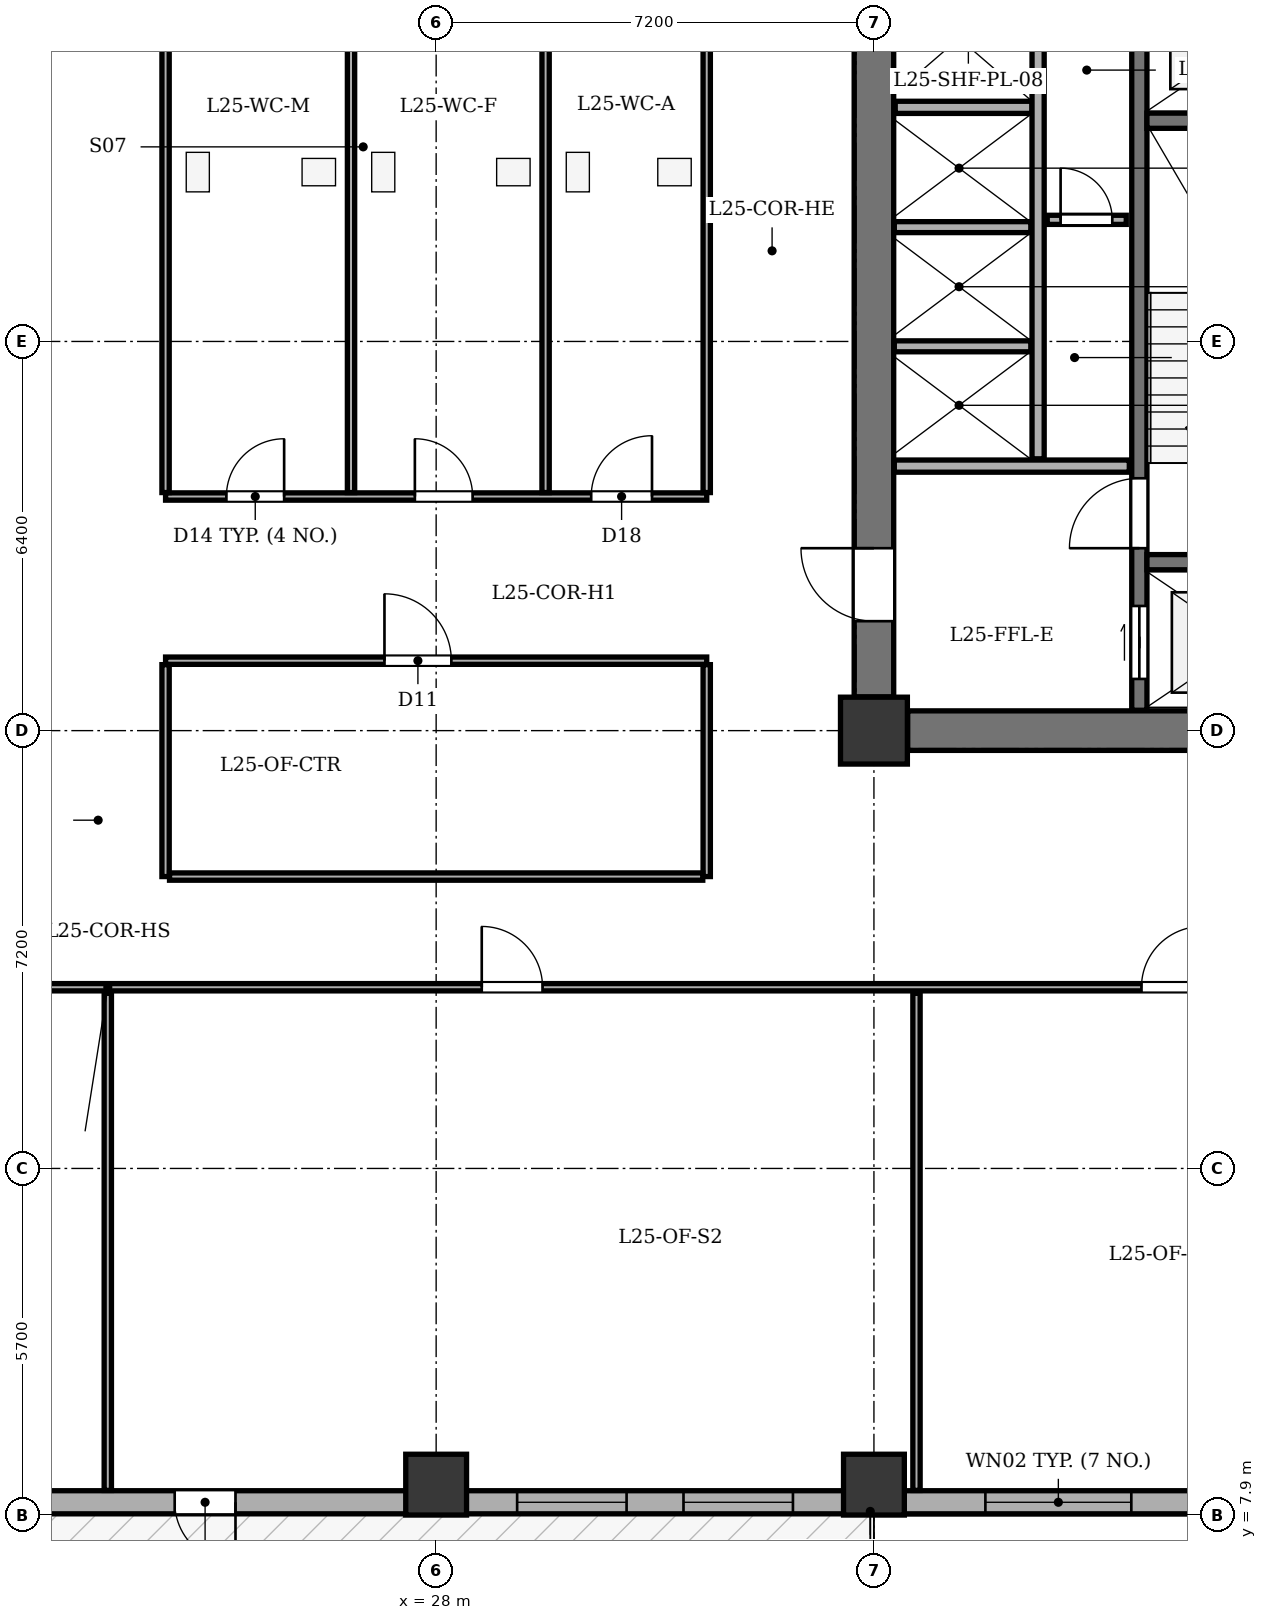
"""IFC4 building model, lengths in metres.
Left out: names, types, materials, properties, quantities, classifications, styles, units other than length and angle.
Written with IfcOpenShell. Run it as: python <this file> out.ifc"""

import sys

from ifc_helpers import new_model, si_unit, direction, frame, frame_2d, origin, origin_2d, place, context, subcontext, project, spatial, rectangle, extrude, element, fill, save


model = new_model("IFC4")
c1 = context("Model", 3, precision=1e-05, world=origin(), true_north=direction((0.0, 1.0)))
c2 = subcontext(c1, "Body", "Model", "MODEL_VIEW")
j1 = project(units=[si_unit("LENGTHUNIT", "METRE"), si_unit("PLANEANGLEUNIT", "RADIAN")], contexts=[c1])
p1 = place(None, origin())
s1 = spatial("IfcSite", under=j1, at=p1, CompositionType="ELEMENT")
p2 = place(p1, origin())
s2 = spatial("IfcBuilding", under=s1, at=p2, CompositionType="ELEMENT")
p3 = place(p2, frame((0.0, 0.0, 102.3)))
s3 = spatial("IfcBuildingStorey", under=s2, at=p3, CompositionType="ELEMENT", Elevation=102.3)
p4 = place(p3, frame((35.2, 20.8, 0.0), z_axis=(0.0, 0.0, 1.0), x_axis=(1.0, 0.0, 0.0)))
e1 = element("IfcColumn", 1, at=p4, inside=s3, PredefinedType="COLUMN", context=c2, shape_type="SweptSolid", body=[
    extrude(rectangle(XDim=1.1, YDim=1.1, at=origin_2d()), origin(), (0.0, 0.0, 1.0), 3.9),
])
for number, where, z_axis, x_axis in (
    (2, (28.0, 8.4, 0.0), (0.0, 0.0, 1.0), (1.0, 0.0, 0.0)),
    (3, (35.2, 8.4, 0.0), (0.0, 0.0, 1.0), (1.0, 0.0, 0.0)),
):
    element("IfcColumn", number, at=place(p3, frame(where, z_axis=z_axis, x_axis=x_axis)), inside=s3, PredefinedType="COLUMN", context=c2, shape_type="SweptSolid", body=[
        extrude(rectangle(XDim=1.0, YDim=1.0, at=origin_2d()), origin(), (0.0, 0.0, 1.0), 3.9),
    ])
p5 = place(p3, frame((44.3, 8.11, 0.0), z_axis=(0.0, 0.0, 1.0), x_axis=(-1.0, 0.0, 0.0)))
e4 = element("IfcWall", 4, at=p5, inside=s3, PredefinedType="STANDARD", context=c2, shape_type="SweptSolid", body=[
    extrude(rectangle(XDim=35.0, YDim=0.38, at=frame_2d((17.5, 0.0))), origin(), (0.0, 0.0, 1.0), 3.135),
])
p6 = place(p5, frame((19.6, 0.0, 0.0)))
e5 = element("IfcOpeningElement", 5, at=p6, cuts=e4, PredefinedType="OPENING", context=c2, shape_type="SweptSolid", body=[
    extrude(rectangle(XDim=1.0, YDim=2.02, at=frame_2d((0.5, 1.01))), frame((0.0, 0.2, 0.0), z_axis=(0.0, -1.0, 0.0), x_axis=(1.0, 0.0, 0.0)), (0.0, 0.0, 1.0), 0.4),
])
p7 = place(p5, frame((1.783, 0.0, 0.8)))
e6 = element("IfcOpeningElement", 6, at=p7, cuts=e4, PredefinedType="OPENING", context=c2, shape_type="SweptSolid", body=[
    extrude(rectangle(XDim=1.8, YDim=1.9, at=frame_2d((0.9, 0.95))), frame((0.0, 0.2, 0.0), z_axis=(0.0, -1.0, 0.0), x_axis=(1.0, 0.0, 0.0)), (0.0, 0.0, 1.0), 0.4),
])
p8 = place(p5, frame((4.867, 0.0, 0.8)))
e7 = element("IfcOpeningElement", 7, at=p8, cuts=e4, PredefinedType="OPENING", context=c2, shape_type="SweptSolid", body=[
    extrude(rectangle(XDim=2.4, YDim=1.9, at=frame_2d((1.2, 0.95))), frame((0.0, 0.2, 0.0), z_axis=(0.0, -1.0, 0.0), x_axis=(1.0, 0.0, 0.0)), (0.0, 0.0, 1.0), 0.4),
])
p9 = place(p5, frame((10.432, 0.0, 0.8)))
e8 = element("IfcOpeningElement", 8, at=p9, cuts=e4, PredefinedType="OPENING", context=c2, shape_type="SweptSolid", body=[
    extrude(rectangle(XDim=1.8, YDim=1.9, at=frame_2d((0.9, 0.95))), frame((0.0, 0.2, 0.0), z_axis=(0.0, -1.0, 0.0), x_axis=(1.0, 0.0, 0.0)), (0.0, 0.0, 1.0), 0.4),
])
p10 = place(p5, frame((13.168, 0.0, 0.8)))
e9 = element("IfcOpeningElement", 9, at=p10, cuts=e4, PredefinedType="OPENING", context=c2, shape_type="SweptSolid", body=[
    extrude(rectangle(XDim=1.8, YDim=1.9, at=frame_2d((0.9, 0.95))), frame((0.0, 0.2, 0.0), z_axis=(0.0, -1.0, 0.0), x_axis=(1.0, 0.0, 0.0)), (0.0, 0.0, 1.0), 0.4),
])
p11 = place(p5, frame((25.924, 0.0, 0.8)))
e10 = element("IfcOpeningElement", 10, at=p11, cuts=e4, PredefinedType="OPENING", context=c2, shape_type="SweptSolid", body=[
    extrude(rectangle(XDim=1.8, YDim=1.9, at=frame_2d((0.9, 0.95))), frame((0.0, 0.2, 0.0), z_axis=(0.0, -1.0, 0.0), x_axis=(1.0, 0.0, 0.0)), (0.0, 0.0, 1.0), 0.4),
])
p12 = place(p5, frame((30.376, 0.0, 0.8)))
e11 = element("IfcOpeningElement", 11, at=p12, cuts=e4, PredefinedType="OPENING", context=c2, shape_type="SweptSolid", body=[
    extrude(rectangle(XDim=2.4, YDim=1.9, at=frame_2d((1.2, 0.95))), frame((0.0, 0.2, 0.0), z_axis=(0.0, -1.0, 0.0), x_axis=(1.0, 0.0, 0.0)), (0.0, 0.0, 1.0), 0.4),
])
p13 = place(p3, frame((35.755, 20.8, 0.0), z_axis=(0.0, 0.0, 1.0), x_axis=(1.0, 0.0, 0.0)))
e12 = element("IfcWall", 12, at=p13, inside=s3, PredefinedType="SHEAR", context=c2, shape_type="SweptSolid", body=[
    extrude(rectangle(XDim=6.89, YDim=0.65, at=frame_2d((3.445, 0.0))), origin(), (0.0, 0.0, 1.0), 3.6),
])
p14 = place(p3, frame((35.2, 21.355, 0.0), z_axis=(0.0, 0.0, 1.0), x_axis=(0.0, 1.0, 0.0)))
e13 = element("IfcWall", 13, at=p14, inside=s3, PredefinedType="SHEAR", context=c2, shape_type="SweptSolid", body=[
    extrude(rectangle(XDim=11.69, YDim=0.65, at=frame_2d((5.845, 0.0))), origin(), (0.0, 0.0, 1.0), 3.6),
])
p15 = place(p14, frame((1.245, 0.0, 0.0)))
e14 = element("IfcOpeningElement", 14, at=p15, cuts=e13, PredefinedType="OPENING", context=c2, shape_type="SweptSolid", body=[
    extrude(rectangle(XDim=1.2, YDim=2.15, at=frame_2d((0.6, 1.075))), frame((0.0, 0.335, 0.0), z_axis=(0.0, -1.0, 0.0), x_axis=(1.0, 0.0, 0.0)), (0.0, 0.0, 1.0), 0.67),
])
p16 = place(p3, frame((39.565, 21.135, 0.0), z_axis=(0.0, 0.0, 1.0), x_axis=(0.0, 1.0, 0.0)))
e15 = element("IfcWall", 15, at=p16, inside=s3, PredefinedType="SHEAR", context=c2, shape_type="SweptSolid", body=[
    extrude(rectangle(XDim=12.13, YDim=0.25, at=frame_2d((6.065, 0.0))), origin(), (0.0, 0.0, 1.0), 3.6),
])
p17 = place(p16, frame((0.515, 0.0, 0.0)))
e16 = element("IfcOpeningElement", 16, at=p17, cuts=e15, PredefinedType="OPENING", context=c2, shape_type="SweptSolid", body=[
    extrude(rectangle(XDim=1.2, YDim=2.15, at=frame_2d((0.6, 1.075))), frame((0.0, 0.135, 0.0), z_axis=(0.0, -1.0, 0.0), x_axis=(1.0, 0.0, 0.0)), (0.0, 0.0, 1.0), 0.27),
])
p18 = place(p16, frame((2.665, 0.0, 0.0)))
e17 = element("IfcOpeningElement", 17, at=p18, cuts=e15, PredefinedType="OPENING", context=c2, shape_type="SweptSolid", body=[
    extrude(rectangle(XDim=1.15, YDim=2.15, at=frame_2d((0.575, 1.075))), frame((0.0, 0.135, 0.0), z_axis=(0.0, -1.0, 0.0), x_axis=(1.0, 0.0, 0.0)), (0.0, 0.0, 1.0), 0.27),
])
for number, where, z_axis, x_axis in (
    (18, (39.69, 23.57, 0.0), (0.0, 0.0, 1.0), (1.0, 0.0, 0.0)),
    (19, (39.69, 30.83, 0.0), (0.0, 0.0, 1.0), (1.0, 0.0, 0.0)),
):
    element("IfcWall", number, at=place(p3, frame(where, z_axis=z_axis, x_axis=x_axis)), inside=s3, PredefinedType="SHEAR", context=c2, shape_type="SweptSolid", body=[
        extrude(rectangle(XDim=3.175, YDim=0.25, at=frame_2d((1.587, 0.0))), origin(), (0.0, 0.0, 1.0), 3.6),
    ])
p19 = place(p3, frame((35.535, 25.15, 0.0), z_axis=(0.0, 0.0, 1.0), x_axis=(1.0, 0.0, 0.0)))
e20 = element("IfcWall", 20, at=p19, inside=s3, PredefinedType="SOLIDWALL", context=c2, shape_type="SweptSolid", body=[
    extrude(rectangle(XDim=3.865, YDim=0.2, at=frame_2d((1.933, 0.0))), origin(), (0.0, 0.0, 1.0), 3.6),
])
p20 = place(p3, frame((35.55, 31.05, 0.0), z_axis=(0.0, 0.0, 1.0), x_axis=(1.0, 0.0, 0.0)))
e21 = element("IfcWall", 21, at=p20, inside=s3, PredefinedType="SOLIDWALL", context=c2, shape_type="SweptSolid", body=[
    extrude(rectangle(XDim=2.25, YDim=0.2, at=frame_2d((1.125, 0.0))), origin(), (0.0, 0.0, 1.0), 3.6),
])
p21 = place(p3, frame((37.9, 25.27, 0.0), z_axis=(0.0, 0.0, 1.0), x_axis=(0.0, 1.0, 0.0)))
e22 = element("IfcWall", 22, at=p21, inside=s3, PredefinedType="SOLIDWALL", context=c2, shape_type="SweptSolid", body=[
    extrude(rectangle(XDim=7.995, YDim=0.2, at=frame_2d((3.998, 0.0))), origin(), (0.0, 0.0, 1.0), 3.6),
])
for number, where, z_axis, x_axis in (
    (23, (35.535, 27.12, 0.0), (0.0, 0.0, 1.0), (1.0, 0.0, 0.0)),
    (24, (35.535, 29.08, 0.0), (0.0, 0.0, 1.0), (1.0, 0.0, 0.0)),
):
    element("IfcWall", number, at=place(p3, frame(where, z_axis=z_axis, x_axis=x_axis)), inside=s3, PredefinedType="PARTITIONING", context=c2, shape_type="SweptSolid", body=[
        extrude(rectangle(XDim=2.245, YDim=0.18, at=frame_2d((1.123, 0.0))), origin(), (0.0, 0.0, 1.0), 3.6),
    ])
p22 = place(p3, frame((38.05, 29.2, 0.0), z_axis=(0.0, 0.0, 1.0), x_axis=(1.0, 0.0, 0.0)))
e25 = element("IfcWall", 25, at=p22, inside=s3, PredefinedType="PARTITIONING", context=c2, shape_type="SweptSolid", body=[
    extrude(rectangle(XDim=1.3, YDim=0.15, at=frame_2d((0.65, 0.0))), origin(), (0.0, 0.0, 1.0), 3.6),
])
p23 = place(p22, frame((0.22, 0.0, 0.0)))
e26 = element("IfcOpeningElement", 26, at=p23, cuts=e25, PredefinedType="OPENING", context=c2, shape_type="SweptSolid", body=[
    extrude(rectangle(XDim=0.85, YDim=2.02, at=frame_2d((0.425, 1.01))), frame((0.0, 0.085, 0.0), z_axis=(0.0, -1.0, 0.0), x_axis=(1.0, 0.0, 0.0)), (0.0, 0.0, 1.0), 0.17),
])
p24 = place(p3, frame((23.55, 24.65, 0.0), z_axis=(0.0, 0.0, 1.0), x_axis=(1.0, 0.0, 0.0)))
e27 = element("IfcWall", 27, at=p24, inside=s3, PredefinedType="PARTITIONING", context=c2, shape_type="SweptSolid", body=[
    extrude(rectangle(XDim=8.9, YDim=0.12, at=frame_2d((4.45, 0.0))), origin(), (0.0, 0.0, 1.0), 3.135),
])
p25 = place(p24, frame((1.0, 0.0, 0.0)))
e28 = element("IfcOpeningElement", 28, at=p25, cuts=e27, PredefinedType="OPENING", context=c2, shape_type="SweptSolid", body=[
    extrude(rectangle(XDim=0.95, YDim=2.1, at=frame_2d((0.475, 1.05))), frame((0.0, 0.07, 0.0), z_axis=(0.0, -1.0, 0.0), x_axis=(1.0, 0.0, 0.0)), (0.0, 0.0, 1.0), 0.14),
])
p26 = place(p24, frame((4.1, 0.0, 0.0)))
e29 = element("IfcOpeningElement", 29, at=p26, cuts=e27, PredefinedType="OPENING", context=c2, shape_type="SweptSolid", body=[
    extrude(rectangle(XDim=0.95, YDim=2.1, at=frame_2d((0.475, 1.05))), frame((0.0, 0.07, 0.0), z_axis=(0.0, -1.0, 0.0), x_axis=(1.0, 0.0, 0.0)), (0.0, 0.0, 1.0), 0.14),
])
p27 = place(p24, frame((7.0, 0.0, 0.0)))
e30 = element("IfcOpeningElement", 30, at=p27, cuts=e27, PredefinedType="OPENING", context=c2, shape_type="SweptSolid", body=[
    extrude(rectangle(XDim=1.0, YDim=2.1, at=frame_2d((0.5, 1.05))), frame((0.0, 0.07, 0.0), z_axis=(0.0, -1.0, 0.0), x_axis=(1.0, 0.0, 0.0)), (0.0, 0.0, 1.0), 0.14),
])
for number, where, z_axis, x_axis in (
    (31, (23.55, 24.715, 0.0), (0.0, 0.0, 1.0), (0.0, 1.0, 0.0)),
    (32, (32.45, 24.715, 0.0), (0.0, 0.0, 1.0), (0.0, 1.0, 0.0)),
    (33, (26.6, 24.715, 0.0), (0.0, 0.0, 1.0), (0.0, 1.0, 0.0)),
):
    element("IfcWall", number, at=place(p3, frame(where, z_axis=z_axis, x_axis=x_axis)), inside=s3, PredefinedType="PARTITIONING", context=c2, shape_type="SweptSolid", body=[
        extrude(rectangle(XDim=11.285, YDim=0.12, at=frame_2d((5.643, 0.0))), origin(), (0.0, 0.0, 1.0), 3.6),
    ])
p28 = place(p3, frame((29.8, 24.715, 0.0), z_axis=(0.0, 0.0, 1.0), x_axis=(0.0, 1.0, 0.0)))
e34 = element("IfcWall", 34, at=p28, inside=s3, PredefinedType="PARTITIONING", context=c2, shape_type="SweptSolid", body=[
    extrude(rectangle(XDim=11.285, YDim=0.12, at=frame_2d((5.643, 0.0))), origin(), (0.0, 0.0, 1.0), 3.135),
])
p29 = place(p3, frame((23.55, 21.95, 0.0), z_axis=(0.0, 0.0, 1.0), x_axis=(1.0, 0.0, 0.0)))
e35 = element("IfcWall", 35, at=p29, inside=s3, PredefinedType="PARTITIONING", context=c2, shape_type="SweptSolid", body=[
    extrude(rectangle(XDim=8.9, YDim=0.12, at=frame_2d((4.45, 0.0))), origin(), (0.0, 0.0, 1.0), 3.135),
])
p30 = place(p29, frame((3.6, 0.0, 0.0)))
e36 = element("IfcOpeningElement", 36, at=p30, cuts=e35, PredefinedType="OPENING", context=c2, shape_type="SweptSolid", body=[
    extrude(rectangle(XDim=1.1, YDim=2.15, at=frame_2d((0.55, 1.075))), frame((0.0, 0.07, 0.0), z_axis=(0.0, -1.0, 0.0), x_axis=(1.0, 0.0, 0.0)), (0.0, 0.0, 1.0), 0.14),
])
for number, where, z_axis, x_axis in (
    (37, (23.55, 18.4, 0.0), (0.0, 0.0, 1.0), (0.0, 1.0, 0.0)),
    (38, (32.45, 18.4, 0.0), (0.0, 0.0, 1.0), (0.0, 1.0, 0.0)),
):
    element("IfcWall", number, at=place(p3, frame(where, z_axis=z_axis, x_axis=x_axis)), inside=s3, PredefinedType="PARTITIONING", context=c2, shape_type="SweptSolid", body=[
        extrude(rectangle(XDim=3.485, YDim=0.12, at=frame_2d((1.743, 0.0))), origin(), (0.0, 0.0, 1.0), 3.6),
    ])
p31 = place(p3, frame((23.615, 18.4, 0.0), z_axis=(0.0, 0.0, 1.0), x_axis=(1.0, 0.0, 0.0)))
e39 = element("IfcWall", 39, at=p31, inside=s3, PredefinedType="PARTITIONING", context=c2, shape_type="SweptSolid", body=[
    extrude(rectangle(XDim=8.77, YDim=0.12, at=frame_2d((4.385, 0.0))), origin(), (0.0, 0.0, 1.0), 3.6),
])
p32 = place(p3, frame((9.3, 16.58, 0.0), z_axis=(0.0, 0.0, 1.0), x_axis=(1.0, 0.0, 0.0)))
e40 = element("IfcWall", 40, at=p32, inside=s3, PredefinedType="PARTITIONING", context=c2, shape_type="SweptSolid", body=[
    extrude(rectangle(XDim=35.0, YDim=0.12, at=frame_2d((17.5, 0.0))), origin(), (0.0, 0.0, 1.0), 3.6),
])
p33 = place(p32, frame((6.15, 0.0, 0.0)))
e41 = element("IfcOpeningElement", 41, at=p33, cuts=e40, PredefinedType="OPENING", context=c2, shape_type="SweptSolid", body=[
    extrude(rectangle(XDim=1.0, YDim=2.1, at=frame_2d((0.5, 1.05))), frame((0.0, 0.07, 0.0), z_axis=(0.0, -1.0, 0.0), x_axis=(1.0, 0.0, 0.0)), (0.0, 0.0, 1.0), 0.14),
])
p34 = place(p32, frame((19.45, 0.0, 0.0)))
e42 = element("IfcOpeningElement", 42, at=p34, cuts=e40, PredefinedType="OPENING", context=c2, shape_type="SweptSolid", body=[
    extrude(rectangle(XDim=1.0, YDim=2.1, at=frame_2d((0.5, 1.05))), frame((0.0, 0.07, 0.0), z_axis=(0.0, -1.0, 0.0), x_axis=(1.0, 0.0, 0.0)), (0.0, 0.0, 1.0), 0.14),
])
p35 = place(p32, frame((30.3, 0.0, 0.0)))
e43 = element("IfcOpeningElement", 43, at=p35, cuts=e40, PredefinedType="OPENING", context=c2, shape_type="SweptSolid", body=[
    extrude(rectangle(XDim=1.0, YDim=2.1, at=frame_2d((0.5, 1.05))), frame((0.0, 0.07, 0.0), z_axis=(0.0, -1.0, 0.0), x_axis=(1.0, 0.0, 0.0)), (0.0, 0.0, 1.0), 0.14),
])
p36 = place(p3, frame((22.6, 8.305, 0.0), z_axis=(0.0, 0.0, 1.0), x_axis=(0.0, 1.0, 0.0)))
e44 = element("IfcWall", 44, at=p36, inside=s3, PredefinedType="PARTITIONING", context=c2, shape_type="SweptSolid", body=[
    extrude(rectangle(XDim=8.175, YDim=0.12, at=frame_2d((4.087, 0.0))), origin(), (0.0, 0.0, 1.0), 3.135),
])
p37 = place(p3, frame((35.9, 8.305, 0.0), z_axis=(0.0, 0.0, 1.0), x_axis=(0.0, 1.0, 0.0)))
e45 = element("IfcWall", 45, at=p37, inside=s3, PredefinedType="PARTITIONING", context=c2, shape_type="SweptSolid", body=[
    extrude(rectangle(XDim=8.175, YDim=0.12, at=frame_2d((4.087, 0.0))), origin(), (0.0, 0.0, 1.0), 3.6),
])
p38 = place(p6, origin())
e46 = element("IfcDoor", 46, at=p38, inside=s3, OperationType="SINGLE_SWING_LEFT", PredefinedType="DOOR", context=c2, shape_type="SweptSolid", body=[
    extrude(rectangle(XDim=1.0, YDim=2.02, at=frame_2d((0.5, 1.01))), frame((0.0, 0.025, 0.0), z_axis=(0.0, -1.0, 0.0), x_axis=(1.0, 0.0, 0.0)), (0.0, 0.0, 1.0), 0.05),
])
fill(e5, e46)
p39 = place(p8, origin())
e47 = element("IfcWindow", 47, at=p39, inside=s3, PartitioningType="SINGLE_PANEL", PredefinedType="WINDOW", context=c2, shape_type="SweptSolid", body=[
    extrude(rectangle(XDim=2.4, YDim=1.9, at=frame_2d((1.2, 0.95))), frame((0.0, -0.01, 0.0), z_axis=(0.0, -1.0, 0.0), x_axis=(1.0, 0.0, 0.0)), (0.0, 0.0, 1.0), 0.06),
])
fill(e7, e47)
p40 = place(p9, origin())
e48 = element("IfcWindow", 48, at=p40, inside=s3, PartitioningType="SINGLE_PANEL", PredefinedType="WINDOW", context=c2, shape_type="SweptSolid", body=[
    extrude(rectangle(XDim=1.8, YDim=1.9, at=frame_2d((0.9, 0.95))), frame((0.0, -0.01, 0.0), z_axis=(0.0, -1.0, 0.0), x_axis=(1.0, 0.0, 0.0)), (0.0, 0.0, 1.0), 0.06),
])
fill(e8, e48)
p41 = place(p10, origin())
e49 = element("IfcWindow", 49, at=p41, inside=s3, PartitioningType="SINGLE_PANEL", PredefinedType="WINDOW", context=c2, shape_type="SweptSolid", body=[
    extrude(rectangle(XDim=1.8, YDim=1.9, at=frame_2d((0.9, 0.95))), frame((0.0, -0.01, 0.0), z_axis=(0.0, -1.0, 0.0), x_axis=(1.0, 0.0, 0.0)), (0.0, 0.0, 1.0), 0.06),
])
fill(e9, e49)
p42 = place(p15, origin())
e50 = element("IfcDoor", 50, at=p42, inside=s3, OperationType="SINGLE_SWING_RIGHT", PredefinedType="DOOR", context=c2, shape_type="SweptSolid", body=[
    extrude(rectangle(XDim=1.2, YDim=2.15, at=frame_2d((0.6, 1.075))), frame((0.0, 0.025, 0.0), z_axis=(0.0, -1.0, 0.0), x_axis=(1.0, 0.0, 0.0)), (0.0, 0.0, 1.0), 0.05),
])
fill(e14, e50)
p43 = place(p17, origin())
e51 = element("IfcDoor", 51, at=p43, inside=s3, OperationType="DOUBLE_DOOR_SLIDING", PredefinedType="DOOR", context=c2, shape_type="SweptSolid", body=[
    extrude(rectangle(XDim=1.2, YDim=2.15, at=frame_2d((0.6, 1.075))), frame((0.0, 0.025, 0.0), z_axis=(0.0, -1.0, 0.0), x_axis=(1.0, 0.0, 0.0)), (0.0, 0.0, 1.0), 0.05),
])
fill(e16, e51)
p44 = place(p18, origin())
e52 = element("IfcDoor", 52, at=p44, inside=s3, OperationType="SINGLE_SWING_LEFT", PredefinedType="DOOR", context=c2, shape_type="SweptSolid", body=[
    extrude(rectangle(XDim=1.15, YDim=2.15, at=frame_2d((0.575, 1.075))), frame((0.0, 0.025, 0.0), z_axis=(0.0, -1.0, 0.0), x_axis=(1.0, 0.0, 0.0)), (0.0, 0.0, 1.0), 0.05),
])
fill(e17, e52)
p45 = place(p23, origin())
e53 = element("IfcDoor", 53, at=p45, inside=s3, OperationType="SINGLE_SWING_LEFT", PredefinedType="DOOR", context=c2, shape_type="SweptSolid", body=[
    extrude(rectangle(XDim=0.85, YDim=2.02, at=frame_2d((0.425, 1.01))), frame((0.0, 0.025, 0.0), z_axis=(0.0, -1.0, 0.0), x_axis=(1.0, 0.0, 0.0)), (0.0, 0.0, 1.0), 0.05),
])
fill(e26, e53)
p46 = place(p25, origin())
e54 = element("IfcDoor", 54, at=p46, inside=s3, OperationType="SINGLE_SWING_RIGHT", PredefinedType="DOOR", context=c2, shape_type="SweptSolid", body=[
    extrude(rectangle(XDim=0.95, YDim=2.1, at=frame_2d((0.475, 1.05))), frame((0.0, 0.025, 0.0), z_axis=(0.0, -1.0, 0.0), x_axis=(1.0, 0.0, 0.0)), (0.0, 0.0, 1.0), 0.05),
])
fill(e28, e54)
p47 = place(p26, origin())
e55 = element("IfcDoor", 55, at=p47, inside=s3, OperationType="SINGLE_SWING_LEFT", PredefinedType="DOOR", context=c2, shape_type="SweptSolid", body=[
    extrude(rectangle(XDim=0.95, YDim=2.1, at=frame_2d((0.475, 1.05))), frame((0.0, 0.025, 0.0), z_axis=(0.0, -1.0, 0.0), x_axis=(1.0, 0.0, 0.0)), (0.0, 0.0, 1.0), 0.05),
])
fill(e29, e55)
p48 = place(p27, origin())
e56 = element("IfcDoor", 56, at=p48, inside=s3, OperationType="SINGLE_SWING_RIGHT", PredefinedType="DOOR", context=c2, shape_type="SweptSolid", body=[
    extrude(rectangle(XDim=1.0, YDim=2.1, at=frame_2d((0.5, 1.05))), frame((0.0, 0.025, 0.0), z_axis=(0.0, -1.0, 0.0), x_axis=(1.0, 0.0, 0.0)), (0.0, 0.0, 1.0), 0.05),
])
fill(e30, e56)
p49 = place(p30, origin())
e57 = element("IfcDoor", 57, at=p49, inside=s3, OperationType="SINGLE_SWING_LEFT", PredefinedType="DOOR", context=c2, shape_type="SweptSolid", body=[
    extrude(rectangle(XDim=1.1, YDim=2.15, at=frame_2d((0.55, 1.075))), frame((0.0, 0.025, 0.0), z_axis=(0.0, -1.0, 0.0), x_axis=(1.0, 0.0, 0.0)), (0.0, 0.0, 1.0), 0.05),
])
fill(e36, e57)
p50 = place(p34, origin())
e58 = element("IfcDoor", 58, at=p50, inside=s3, OperationType="SINGLE_SWING_LEFT", PredefinedType="DOOR", context=c2, shape_type="SweptSolid", body=[
    extrude(rectangle(XDim=1.0, YDim=2.1, at=frame_2d((0.5, 1.05))), frame((0.0, 0.025, 0.0), z_axis=(0.0, -1.0, 0.0), x_axis=(1.0, 0.0, 0.0)), (0.0, 0.0, 1.0), 0.05),
])
fill(e42, e58)
p51 = place(p35, origin())
e59 = element("IfcDoor", 59, at=p51, inside=s3, OperationType="SINGLE_SWING_RIGHT", PredefinedType="DOOR", context=c2, shape_type="SweptSolid", body=[
    extrude(rectangle(XDim=1.0, YDim=2.1, at=frame_2d((0.5, 1.05))), frame((0.0, 0.025, 0.0), z_axis=(0.0, -1.0, 0.0), x_axis=(1.0, 0.0, 0.0)), (0.0, 0.0, 1.0), 0.05),
])
fill(e43, e59)
save(model, sys.argv[1])
